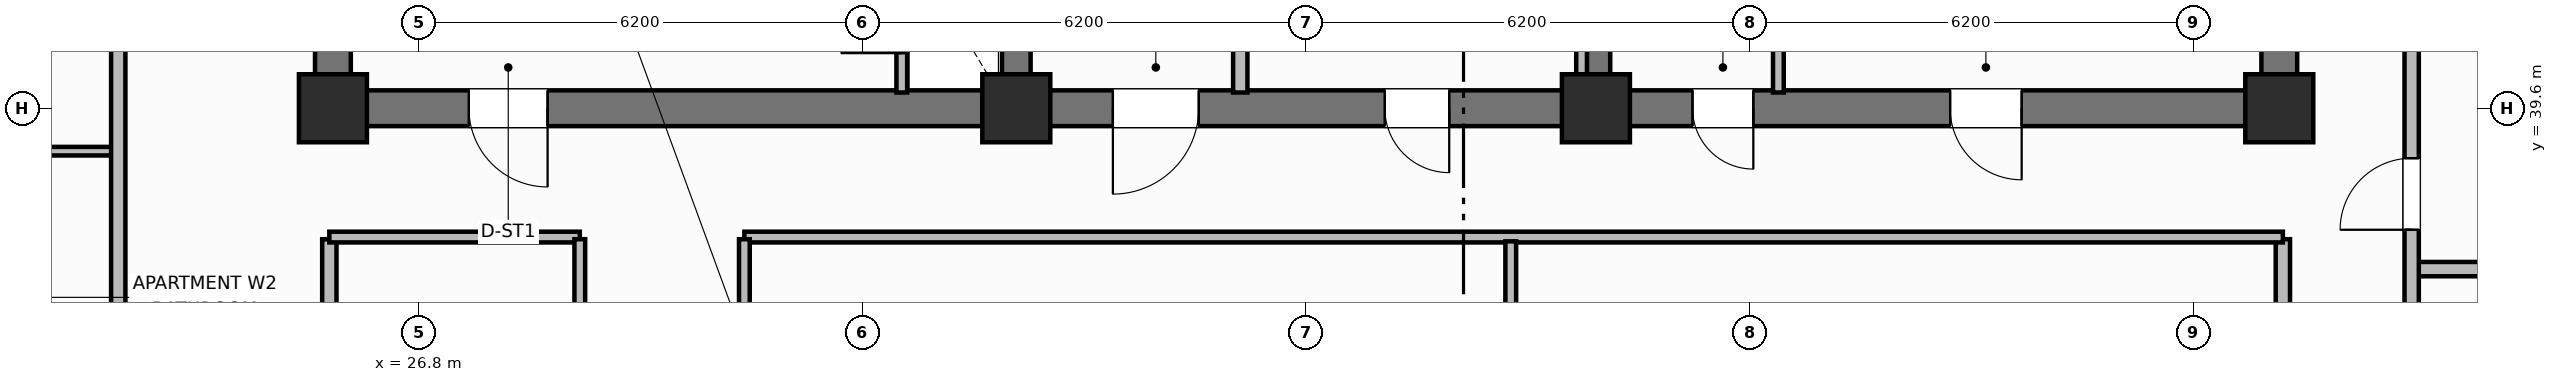
"""IFC4 building model, lengths in metres.
Left out: names, types, materials, properties, quantities, classifications, styles, units other than length and angle.
Written with IfcOpenShell. Run it as: python <this file> out.ifc"""

import sys

from ifc_helpers import new_model, si_unit, direction, frame, frame_2d, origin, origin_2d, place, context, subcontext, project, spatial, rectangle, extrude, element, fill, save


model = new_model("IFC4")
c1 = context("Model", 3, precision=1e-05, world=origin(), true_north=direction((0.0, 1.0)))
c2 = subcontext(c1, "Body", "Model", "MODEL_VIEW")
j1 = project(units=[si_unit("LENGTHUNIT", "METRE"), si_unit("PLANEANGLEUNIT", "RADIAN")], contexts=[c1])
p1 = place(None, origin())
s1 = spatial("IfcSite", under=j1, at=p1, CompositionType="ELEMENT")
p2 = place(p1, origin())
s2 = spatial("IfcBuilding", under=s1, at=p2, CompositionType="ELEMENT")
p3 = place(p2, frame((0.0, 0.0, 184.8)))
s3 = spatial("IfcBuildingStorey", under=s2, at=p3, CompositionType="ELEMENT", Elevation=184.8)
for number, where, z_axis, x_axis in (
    (1, (25.6, 39.85, 0.0), (0.0, 0.0, 1.0), (0.0, 1.0, 0.0)),
    (2, (52.8, 39.85, 0.0), (0.0, 0.0, 1.0), (0.0, 1.0, 0.0)),
):
    element("IfcWall", number, at=place(p3, frame(where, z_axis=z_axis, x_axis=x_axis)), inside=s3, PredefinedType="SHEAR", context=c2, shape_type="SweptSolid", body=[
        extrude(rectangle(XDim=5.7, YDim=0.5, at=frame_2d((2.85, 0.0))), origin(), (0.0, 0.0, 1.0), 3.7),
    ])
p4 = place(p3, frame((52.8, 39.6, 0.0), z_axis=(0.0, 0.0, 1.0), x_axis=(-1.0, 0.0, 0.0)))
e3 = element("IfcWall", 3, at=p4, inside=s3, PredefinedType="SHEAR", context=c2, shape_type="SweptSolid", body=[
    extrude(rectangle(XDim=27.2, YDim=0.5, at=frame_2d((13.6, 0.0))), origin(), (0.0, 0.0, 1.0), 3.7),
])
p5 = place(p4, frame((24.2, 0.0, 0.0)))
e4 = element("IfcOpeningElement", 4, at=p5, cuts=e3, PredefinedType="OPENING", context=c2, shape_type="SweptSolid", body=[
    extrude(rectangle(XDim=1.1, YDim=2.15, at=frame_2d((0.55, 1.075))), frame((0.0, 0.26, 0.0), z_axis=(0.0, -1.0, 0.0), x_axis=(1.0, 0.0, 0.0)), (0.0, 0.0, 1.0), 0.52),
])
p6 = place(p4, frame((15.1, 0.0, 0.0)))
e5 = element("IfcOpeningElement", 5, at=p6, cuts=e3, PredefinedType="OPENING", context=c2, shape_type="SweptSolid", body=[
    extrude(rectangle(XDim=1.2, YDim=2.15, at=frame_2d((0.6, 1.075))), frame((0.0, 0.26, 0.0), z_axis=(0.0, -1.0, 0.0), x_axis=(1.0, 0.0, 0.0)), (0.0, 0.0, 1.0), 0.52),
])
p7 = place(p4, frame((11.6, 0.0, 0.0)))
e6 = element("IfcOpeningElement", 6, at=p7, cuts=e3, PredefinedType="OPENING", context=c2, shape_type="SweptSolid", body=[
    extrude(rectangle(XDim=0.9, YDim=2.1, at=frame_2d((0.45, 1.05))), frame((0.0, 0.26, 0.0), z_axis=(0.0, -1.0, 0.0), x_axis=(1.0, 0.0, 0.0)), (0.0, 0.0, 1.0), 0.52),
])
p8 = place(p4, frame((7.35, 0.0, 0.0)))
e7 = element("IfcOpeningElement", 7, at=p8, cuts=e3, PredefinedType="OPENING", context=c2, shape_type="SweptSolid", body=[
    extrude(rectangle(XDim=0.85, YDim=2.1, at=frame_2d((0.425, 1.05))), frame((0.0, 0.26, 0.0), z_axis=(0.0, -1.0, 0.0), x_axis=(1.0, 0.0, 0.0)), (0.0, 0.0, 1.0), 0.52),
])
p9 = place(p4, frame((3.6, 0.0, 0.0)))
e8 = element("IfcOpeningElement", 8, at=p9, cuts=e3, PredefinedType="OPENING", context=c2, shape_type="SweptSolid", body=[
    extrude(rectangle(XDim=1.0, YDim=2.15, at=frame_2d((0.5, 1.075))), frame((0.0, 0.26, 0.0), z_axis=(0.0, -1.0, 0.0), x_axis=(1.0, 0.0, 0.0)), (0.0, 0.0, 1.0), 0.52),
])
for number, where, z_axis, x_axis in (
    (9, (35.15, 39.85, 0.0), (0.0, 0.0, 1.0), (0.0, 1.0, 0.0)),
    (10, (43.25, 39.85, 0.0), (0.0, 0.0, 1.0), (0.0, 1.0, 0.0)),
):
    element("IfcWall", number, at=place(p3, frame(where, z_axis=z_axis, x_axis=x_axis)), inside=s3, PredefinedType="SHEAR", context=c2, shape_type="SweptSolid", body=[
        extrude(rectangle(XDim=5.7, YDim=0.4, at=frame_2d((2.85, 0.0))), origin(), (0.0, 0.0, 1.0), 3.7),
    ])
for number, where, z_axis, x_axis in (
    (11, (25.6, 39.6, 0.0), (0.0, 0.0, 1.0), (1.0, 0.0, 0.0)),
    (12, (35.15, 39.6, 0.0), (0.0, 0.0, 1.0), (1.0, 0.0, 0.0)),
    (13, (43.25, 39.6, 0.0), (0.0, 0.0, 1.0), (1.0, 0.0, 0.0)),
    (14, (52.8, 39.6, 0.0), (0.0, 0.0, 1.0), (1.0, 0.0, 0.0)),
):
    element("IfcColumn", number, at=place(p3, frame(where, z_axis=z_axis, x_axis=x_axis)), inside=s3, PredefinedType="COLUMN", context=c2, shape_type="SweptSolid", body=[
        extrude(rectangle(XDim=0.95, YDim=0.95, at=origin_2d()), origin(), (0.0, 0.0, 1.0), 3.7),
    ])
p10 = place(p3, frame((33.55, 39.82, 0.0), z_axis=(0.0, 0.0, 1.0), x_axis=(0.0, 1.0, 0.0)))
e15 = element("IfcWall", 15, at=p10, inside=s3, PredefinedType="PARTITIONING", context=c2, shape_type="SweptSolid", body=[
    extrude(rectangle(XDim=2.13, YDim=0.15, at=frame_2d((1.065, 0.0))), origin(), (0.0, 0.0, 1.0), 2.55),
])
p11 = place(p10, frame((0.55, 0.0, 0.0)))
e16 = element("IfcOpeningElement", 16, at=p11, cuts=e15, PredefinedType="OPENING", context=c2, shape_type="SweptSolid", body=[
    extrude(rectangle(XDim=0.85, YDim=2.05, at=frame_2d((0.425, 1.025))), frame((0.0, 0.085, 0.0), z_axis=(0.0, -1.0, 0.0), x_axis=(1.0, 0.0, 0.0)), (0.0, 0.0, 1.0), 0.17),
])
p12 = place(p3, frame((38.28, 39.82, 0.0), z_axis=(0.0, 0.0, 1.0), x_axis=(0.0, 1.0, 0.0)))
e17 = element("IfcWall", 17, at=p12, inside=s3, PredefinedType="PARTITIONING", context=c2, shape_type="SweptSolid", body=[
    extrude(rectangle(XDim=5.63, YDim=0.2, at=frame_2d((2.815, 0.0))), origin(), (0.0, 0.0, 1.0), 2.55),
])
for number, where, z_axis, x_axis in (
    (18, (43.05, 39.82, 0.0), (0.0, 0.0, 1.0), (0.0, 1.0, 0.0)),
    (19, (45.8, 39.82, 0.0), (0.0, 0.0, 1.0), (0.0, 1.0, 0.0)),
):
    element("IfcWall", number, at=place(p3, frame(where, z_axis=z_axis, x_axis=x_axis)), inside=s3, PredefinedType="PARTITIONING", context=c2, shape_type="SweptSolid", body=[
        extrude(rectangle(XDim=5.63, YDim=0.15, at=frame_2d((2.815, 0.0))), origin(), (0.0, 0.0, 1.0), 2.55),
    ])
for number, where, z_axis, x_axis in (
    (20, (25.55, 18.63, 0.0), (0.0, 0.0, 1.0), (0.0, 1.0, 0.0)),
    (21, (52.85, 18.63, 0.0), (0.0, 0.0, 1.0), (0.0, 1.0, 0.0)),
):
    element("IfcWall", number, at=place(p3, frame(where, z_axis=z_axis, x_axis=x_axis)), inside=s3, PredefinedType="PARTITIONING", context=c2, shape_type="SweptSolid", body=[
        extrude(rectangle(XDim=19.14, YDim=0.2, at=frame_2d((9.57, 0.0))), origin(), (0.0, 0.0, 1.0), 2.55),
    ])
p13 = place(p3, frame((25.55, 37.8, 0.0), z_axis=(0.0, 0.0, 1.0), x_axis=(1.0, 0.0, 0.0)))
e22 = element("IfcWall", 22, at=p13, inside=s3, PredefinedType="PARTITIONING", context=c2, shape_type="SweptSolid", body=[
    extrude(rectangle(XDim=3.5, YDim=0.15, at=frame_2d((1.75, 0.0))), origin(), (0.0, 0.0, 1.0), 2.55),
])
p14 = place(p3, frame((31.35, 37.8, 0.0), z_axis=(0.0, 0.0, 1.0), x_axis=(1.0, 0.0, 0.0)))
e23 = element("IfcWall", 23, at=p14, inside=s3, PredefinedType="PARTITIONING", context=c2, shape_type="SweptSolid", body=[
    extrude(rectangle(XDim=21.5, YDim=0.15, at=frame_2d((10.75, 0.0))), origin(), (0.0, 0.0, 1.0), 2.55),
])
p15 = place(p3, frame((42.06, 18.66, 0.0), z_axis=(0.0, 0.0, 1.0), x_axis=(0.0, 1.0, 0.0)))
e24 = element("IfcWall", 24, at=p15, inside=s3, PredefinedType="PARTITIONING", context=c2, shape_type="SweptSolid", body=[
    extrude(rectangle(XDim=19.08, YDim=0.15, at=frame_2d((9.54, 0.0))), origin(), (0.0, 0.0, 1.0), 2.55),
])
p16 = place(p15, frame((6.5, 0.0, 0.0)))
e25 = element("IfcOpeningElement", 25, at=p16, cuts=e24, PredefinedType="OPENING", context=c2, shape_type="SweptSolid", body=[
    extrude(rectangle(XDim=1.0, YDim=2.15, at=frame_2d((0.5, 1.075))), frame((0.0, 0.085, 0.0), z_axis=(0.0, -1.0, 0.0), x_axis=(1.0, 0.0, 0.0)), (0.0, 0.0, 1.0), 0.17),
])
p17 = place(p3, frame((29.05, 18.63, 0.0), z_axis=(0.0, 0.0, 1.0), x_axis=(0.0, 1.0, 0.0)))
e26 = element("IfcWall", 26, at=p17, inside=s3, PredefinedType="PARTITIONING", context=c2, shape_type="SweptSolid", body=[
    extrude(rectangle(XDim=19.14, YDim=0.15, at=frame_2d((9.57, 0.0))), origin(), (0.0, 0.0, 1.0), 2.55),
])
p18 = place(p17, frame((5.5, 0.0, 0.0)))
e27 = element("IfcOpeningElement", 27, at=p18, cuts=e26, PredefinedType="OPENING", context=c2, shape_type="SweptSolid", body=[
    extrude(rectangle(XDim=1.0, YDim=2.15, at=frame_2d((0.5, 1.075))), frame((0.0, 0.085, 0.0), z_axis=(0.0, -1.0, 0.0), x_axis=(1.0, 0.0, 0.0)), (0.0, 0.0, 1.0), 0.17),
])
p19 = place(p3, frame((31.35, 18.63, 0.0), z_axis=(0.0, 0.0, 1.0), x_axis=(0.0, 1.0, 0.0)))
e28 = element("IfcWall", 28, at=p19, inside=s3, PredefinedType="PARTITIONING", context=c2, shape_type="SweptSolid", body=[
    extrude(rectangle(XDim=19.14, YDim=0.15, at=frame_2d((9.57, 0.0))), origin(), (0.0, 0.0, 1.0), 2.55),
])
p20 = place(p19, frame((5.5, 0.0, 0.0)))
e29 = element("IfcOpeningElement", 29, at=p20, cuts=e28, PredefinedType="OPENING", context=c2, shape_type="SweptSolid", body=[
    extrude(rectangle(XDim=1.0, YDim=2.15, at=frame_2d((0.5, 1.075))), frame((0.0, 0.085, 0.0), z_axis=(0.0, -1.0, 0.0), x_axis=(1.0, 0.0, 0.0)), (0.0, 0.0, 1.0), 0.17),
])
p21 = place(p3, frame((20.35, 39.0, 0.0), z_axis=(0.0, 0.0, 1.0), x_axis=(1.0, 0.0, 0.0)))
e30 = element("IfcWall", 30, at=p21, inside=s3, PredefinedType="PARTITIONING", context=c2, shape_type="SweptSolid", body=[
    extrude(rectangle(XDim=2.25, YDim=0.12, at=frame_2d((1.125, 0.0))), origin(), (0.0, 0.0, 1.0), 2.55),
])
p22 = place(p3, frame((22.6, 10.6, 0.0), z_axis=(0.0, 0.0, 1.0), x_axis=(0.0, 1.0, 0.0)))
e31 = element("IfcWall", 31, at=p22, inside=s3, PredefinedType="PARTITIONING", context=c2, shape_type="SweptSolid", body=[
    extrude(rectangle(XDim=35.2, YDim=0.2, at=frame_2d((17.6, 0.0))), origin(), (0.0, 0.0, 1.0), 2.55),
])
p23 = place(p22, frame((2.65, 0.0, 0.0)))
e32 = element("IfcOpeningElement", 32, at=p23, cuts=e31, PredefinedType="OPENING", context=c2, shape_type="SweptSolid", body=[
    extrude(rectangle(XDim=1.0, YDim=2.15, at=frame_2d((0.5, 1.075))), frame((0.0, 0.11, 0.0), z_axis=(0.0, -1.0, 0.0), x_axis=(1.0, 0.0, 0.0)), (0.0, 0.0, 1.0), 0.22),
])
p24 = place(p22, frame((22.75, 0.0, 0.0)))
e33 = element("IfcOpeningElement", 33, at=p24, cuts=e31, PredefinedType="OPENING", context=c2, shape_type="SweptSolid", body=[
    extrude(rectangle(XDim=1.0, YDim=2.15, at=frame_2d((0.5, 1.075))), frame((0.0, 0.11, 0.0), z_axis=(0.0, -1.0, 0.0), x_axis=(1.0, 0.0, 0.0)), (0.0, 0.0, 1.0), 0.22),
])
p25 = place(p3, frame((54.65, 37.352, 0.0), z_axis=(0.0, 0.0, 1.0), x_axis=(1.0, 0.0, 0.0)))
e34 = element("IfcWall", 34, at=p25, inside=s3, PredefinedType="PARTITIONING", context=c2, shape_type="SweptSolid", body=[
    extrude(rectangle(XDim=7.18, YDim=0.2, at=frame_2d((3.59, 0.0))), origin(), (0.0, 0.0, 1.0), 2.55),
])
p26 = place(p3, frame((54.65, 10.6, 0.0), z_axis=(0.0, 0.0, 1.0), x_axis=(0.0, 1.0, 0.0)))
e35 = element("IfcWall", 35, at=p26, inside=s3, PredefinedType="PARTITIONING", context=c2, shape_type="SweptSolid", body=[
    extrude(rectangle(XDim=35.2, YDim=0.2, at=frame_2d((17.6, 0.0))), origin(), (0.0, 0.0, 1.0), 2.55),
])
p27 = place(p26, frame((2.65, 0.0, 0.0)))
e36 = element("IfcOpeningElement", 36, at=p27, cuts=e35, PredefinedType="OPENING", context=c2, shape_type="SweptSolid", body=[
    extrude(rectangle(XDim=1.0, YDim=2.15, at=frame_2d((0.5, 1.075))), frame((0.0, 0.11, 0.0), z_axis=(0.0, -1.0, 0.0), x_axis=(1.0, 0.0, 0.0)), (0.0, 0.0, 1.0), 0.22),
])
p28 = place(p26, frame((11.352, 0.0, 0.0)))
e37 = element("IfcOpeningElement", 37, at=p28, cuts=e35, PredefinedType="OPENING", context=c2, shape_type="SweptSolid", body=[
    extrude(rectangle(XDim=1.0, YDim=2.15, at=frame_2d((0.5, 1.075))), frame((0.0, 0.11, 0.0), z_axis=(0.0, -1.0, 0.0), x_axis=(1.0, 0.0, 0.0)), (0.0, 0.0, 1.0), 0.22),
])
p29 = place(p26, frame((21.37, 0.0, 0.0)))
e38 = element("IfcOpeningElement", 38, at=p29, cuts=e35, PredefinedType="OPENING", context=c2, shape_type="SweptSolid", body=[
    extrude(rectangle(XDim=1.0, YDim=2.15, at=frame_2d((0.5, 1.075))), frame((0.0, 0.11, 0.0), z_axis=(0.0, -1.0, 0.0), x_axis=(1.0, 0.0, 0.0)), (0.0, 0.0, 1.0), 0.22),
])
p30 = place(p26, frame((27.302, 0.0, 0.0)))
e39 = element("IfcOpeningElement", 39, at=p30, cuts=e35, PredefinedType="OPENING", context=c2, shape_type="SweptSolid", body=[
    extrude(rectangle(XDim=1.0, YDim=2.15, at=frame_2d((0.5, 1.075))), frame((0.0, 0.11, 0.0), z_axis=(0.0, -1.0, 0.0), x_axis=(1.0, 0.0, 0.0)), (0.0, 0.0, 1.0), 0.22),
])
p31 = place(p11, origin())
e40 = element("IfcDoor", 40, at=p31, inside=s3, OperationType="SINGLE_SWING_LEFT", PredefinedType="TRAPDOOR", context=c2, shape_type="SweptSolid", body=[
    extrude(rectangle(XDim=0.85, YDim=2.05, at=frame_2d((0.425, 1.025))), frame((0.0, 0.025, 0.0), z_axis=(0.0, -1.0, 0.0), x_axis=(1.0, 0.0, 0.0)), (0.0, 0.0, 1.0), 0.05),
])
fill(e16, e40)
p32 = place(p30, origin())
e41 = element("IfcDoor", 41, at=p32, inside=s3, OperationType="SINGLE_SWING_LEFT", PredefinedType="DOOR", context=c2, shape_type="SweptSolid", body=[
    extrude(rectangle(XDim=1.0, YDim=2.15, at=frame_2d((0.5, 1.075))), frame((0.0, 0.025, 0.0), z_axis=(0.0, -1.0, 0.0), x_axis=(1.0, 0.0, 0.0)), (0.0, 0.0, 1.0), 0.05),
])
fill(e39, e41)
p33 = place(p5, origin())
e42 = element("IfcDoor", 42, at=p33, inside=s3, OperationType="SINGLE_SWING_LEFT", PredefinedType="DOOR", context=c2, shape_type="SweptSolid", body=[
    extrude(rectangle(XDim=1.1, YDim=2.15, at=frame_2d((0.55, 1.075))), frame((0.0, 0.025, 0.0), z_axis=(0.0, -1.0, 0.0), x_axis=(1.0, 0.0, 0.0)), (0.0, 0.0, 1.0), 0.05),
])
fill(e4, e42)
p34 = place(p6, origin())
e43 = element("IfcDoor", 43, at=p34, inside=s3, OperationType="SINGLE_SWING_RIGHT", PredefinedType="DOOR", context=c2, shape_type="SweptSolid", body=[
    extrude(rectangle(XDim=1.2, YDim=2.15, at=frame_2d((0.6, 1.075))), frame((0.0, 0.025, 0.0), z_axis=(0.0, -1.0, 0.0), x_axis=(1.0, 0.0, 0.0)), (0.0, 0.0, 1.0), 0.05),
])
fill(e5, e43)
p35 = place(p7, origin())
e44 = element("IfcDoor", 44, at=p35, inside=s3, OperationType="SINGLE_SWING_LEFT", PredefinedType="DOOR", context=c2, shape_type="SweptSolid", body=[
    extrude(rectangle(XDim=0.9, YDim=2.1, at=frame_2d((0.45, 1.05))), frame((0.0, 0.025, 0.0), z_axis=(0.0, -1.0, 0.0), x_axis=(1.0, 0.0, 0.0)), (0.0, 0.0, 1.0), 0.05),
])
fill(e6, e44)
p36 = place(p8, origin())
e45 = element("IfcDoor", 45, at=p36, inside=s3, OperationType="SINGLE_SWING_LEFT", PredefinedType="DOOR", context=c2, shape_type="SweptSolid", body=[
    extrude(rectangle(XDim=0.85, YDim=2.1, at=frame_2d((0.425, 1.05))), frame((0.0, 0.025, 0.0), z_axis=(0.0, -1.0, 0.0), x_axis=(1.0, 0.0, 0.0)), (0.0, 0.0, 1.0), 0.05),
])
fill(e7, e45)
p37 = place(p9, origin())
e46 = element("IfcDoor", 46, at=p37, inside=s3, OperationType="SINGLE_SWING_LEFT", PredefinedType="DOOR", context=c2, shape_type="SweptSolid", body=[
    extrude(rectangle(XDim=1.0, YDim=2.15, at=frame_2d((0.5, 1.075))), frame((0.0, 0.025, 0.0), z_axis=(0.0, -1.0, 0.0), x_axis=(1.0, 0.0, 0.0)), (0.0, 0.0, 1.0), 0.05),
])
fill(e8, e46)
save(model, sys.argv[1])
